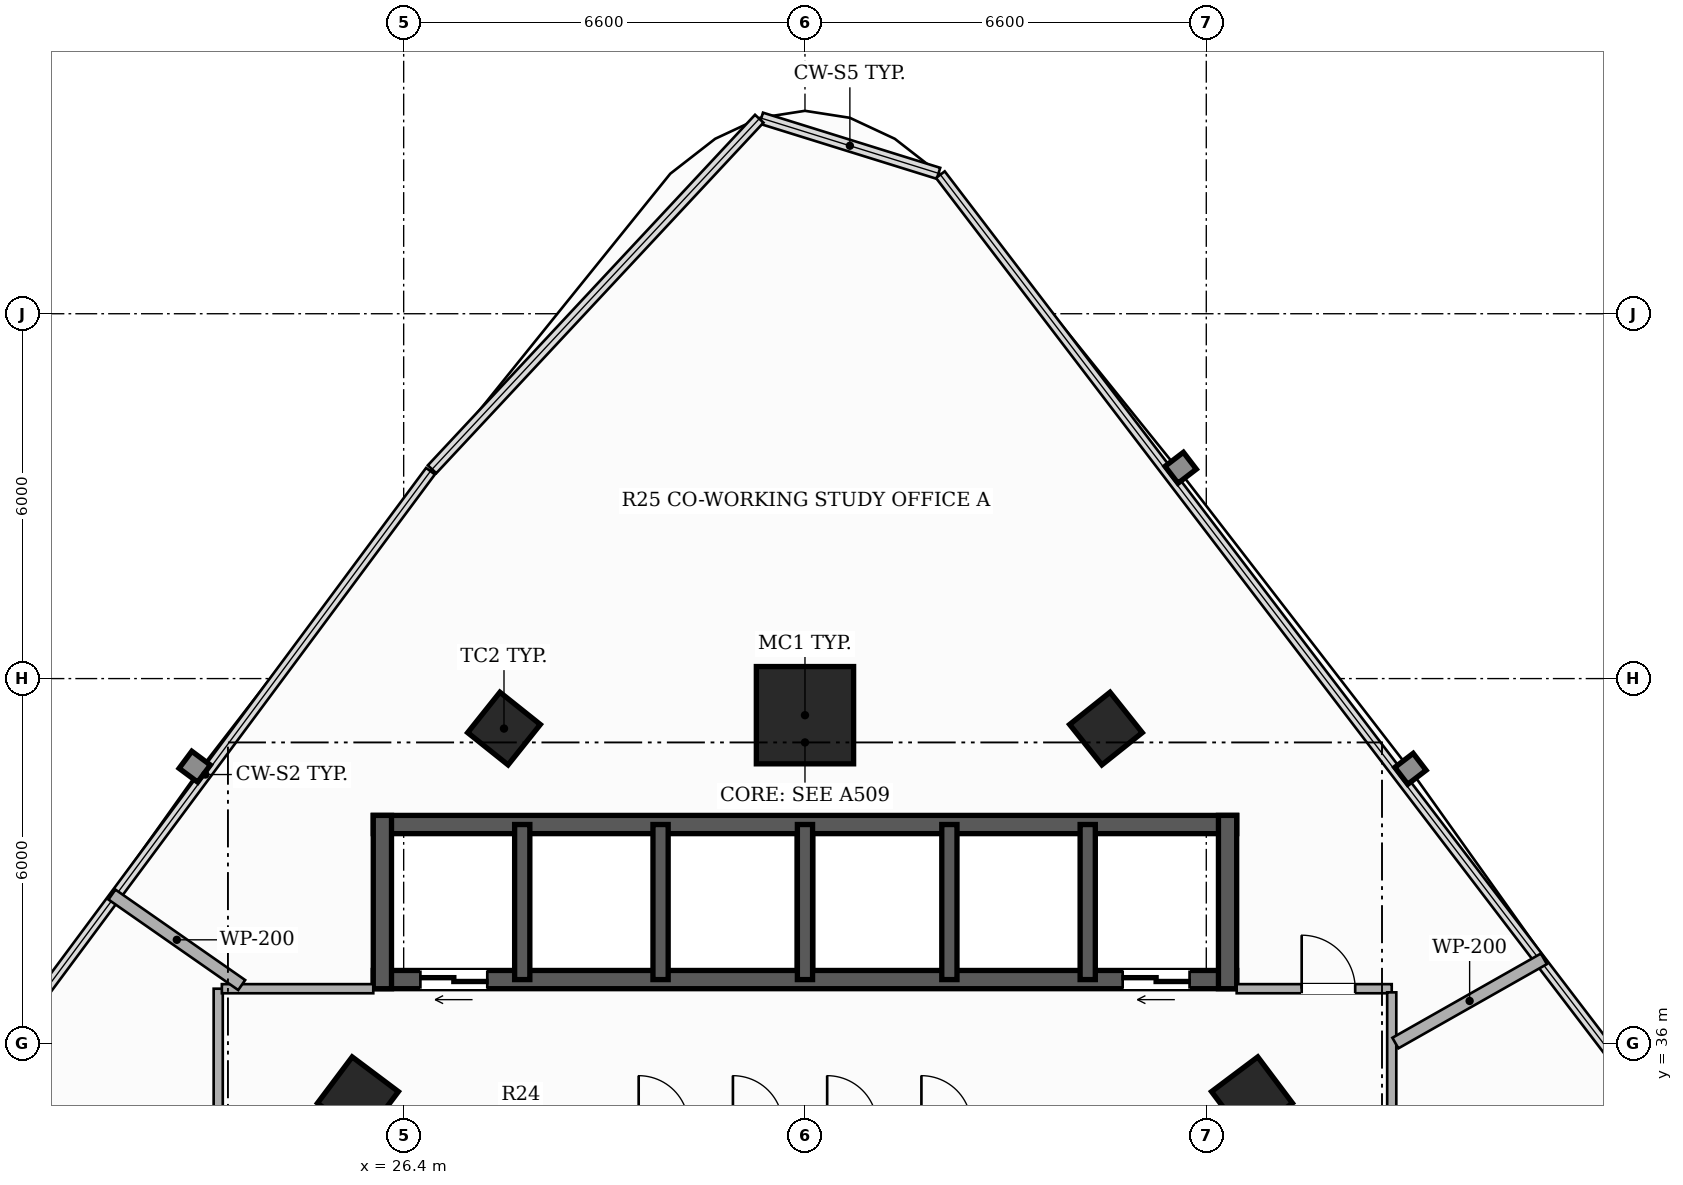
"""IFC4 building model, lengths in metres.
Left out: names, types, materials, properties, quantities, classifications, styles, units other than length and angle.
Written with IfcOpenShell. Run it as: python <this file> out.ifc"""

import sys

from ifc_helpers import new_model, si_unit, direction, frame, frame_2d, origin, origin_2d, place, context, subcontext, project, spatial, rectangle, hollow_rectangle, extrude, element, fill, save


model = new_model("IFC4")
c1 = context("Model", 3, precision=1e-05, world=origin(), true_north=direction((0.0, 1.0)))
c2 = subcontext(c1, "Body", "Model", "MODEL_VIEW")
j1 = project(units=[si_unit("LENGTHUNIT", "METRE"), si_unit("PLANEANGLEUNIT", "RADIAN")], contexts=[c1])
p1 = place(None, origin())
s1 = spatial("IfcSite", under=j1, at=p1, CompositionType="ELEMENT")
p2 = place(p1, origin())
s2 = spatial("IfcBuilding", under=s1, at=p2, CompositionType="ELEMENT")
p3 = place(p2, frame((0.0, 0.0, 70.85)))
s3 = spatial("IfcBuildingStorey", under=s2, at=p3, CompositionType="ELEMENT", Elevation=70.85)
p4 = place(p3, frame((40.1, 37.05, 0.0), z_axis=(0.0, 0.0, 1.0), x_axis=(-1.0, 0.0, 0.0)))
e1 = element("IfcWall", 1, at=p4, inside=s3, PredefinedType="SHEAR", context=c2, shape_type="SweptSolid", body=[
    extrude(rectangle(XDim=14.2, YDim=0.3, at=frame_2d((7.1, 0.0))), origin(), (0.0, 0.0, 1.0), 3.3),
])
p5 = place(p4, frame((12.325, 0.0, 0.0)))
e2 = element("IfcOpeningElement", 2, at=p5, cuts=e1, PredefinedType="OPENING", context=c2, shape_type="SweptSolid", body=[
    extrude(rectangle(XDim=1.1, YDim=2.2, at=frame_2d((0.55, 1.1))), frame((0.0, 0.16, 0.0), z_axis=(0.0, -1.0, 0.0), x_axis=(1.0, 0.0, 0.0)), (0.0, 0.0, 1.0), 0.32),
])
p6 = place(p4, frame((0.775, 0.0, 0.0)))
e3 = element("IfcOpeningElement", 3, at=p6, cuts=e1, PredefinedType="OPENING", context=c2, shape_type="SweptSolid", body=[
    extrude(rectangle(XDim=1.1, YDim=2.2, at=frame_2d((0.55, 1.1))), frame((0.0, 0.16, 0.0), z_axis=(0.0, -1.0, 0.0), x_axis=(1.0, 0.0, 0.0)), (0.0, 0.0, 1.0), 0.32),
])
p7 = place(p3, frame((25.9, 39.6, 0.0), z_axis=(0.0, 0.0, 1.0), x_axis=(1.0, 0.0, 0.0)))
e4 = element("IfcWall", 4, at=p7, inside=s3, PredefinedType="SHEAR", context=c2, shape_type="SweptSolid", body=[
    extrude(rectangle(XDim=14.2, YDim=0.3, at=frame_2d((7.1, 0.0))), origin(), (0.0, 0.0, 1.0), 3.3),
])
for number, where, z_axis, x_axis in (
    (5, (26.05, 36.9, 0.0), (0.0, 0.0, 1.0), (0.0, 1.0, 0.0)),
    (6, (39.95, 36.9, 0.0), (0.0, 0.0, 1.0), (0.0, 1.0, 0.0)),
):
    element("IfcWall", number, at=place(p3, frame(where, z_axis=z_axis, x_axis=x_axis)), inside=s3, PredefinedType="SHEAR", context=c2, shape_type="SweptSolid", body=[
        extrude(rectangle(XDim=2.85, YDim=0.3, at=frame_2d((1.425, 0.0))), origin(), (0.0, 0.0, 1.0), 3.3),
    ])
for number, where, z_axis, x_axis in (
    (7, (28.35, 37.05, 0.0), (0.0, 0.0, 1.0), (0.0, 1.0, 0.0)),
    (8, (30.625, 37.05, 0.0), (0.0, 0.0, 1.0), (0.0, 1.0, 0.0)),
    (9, (33.0, 37.05, 0.0), (0.0, 0.0, 1.0), (0.0, 1.0, 0.0)),
    (10, (35.375, 37.05, 0.0), (0.0, 0.0, 1.0), (0.0, 1.0, 0.0)),
    (11, (37.65, 37.05, 0.0), (0.0, 0.0, 1.0), (0.0, 1.0, 0.0)),
):
    element("IfcWall", number, at=place(p3, frame(where, z_axis=z_axis, x_axis=x_axis)), inside=s3, PredefinedType="SHEAR", context=c2, shape_type="SweptSolid", body=[
        extrude(rectangle(XDim=2.55, YDim=0.25, at=frame_2d((1.275, 0.0))), origin(), (0.0, 0.0, 1.0), 3.3),
    ])
p8 = place(p3, frame((33.0, 41.398, 0.0), z_axis=(0.0, 0.0, 1.0), x_axis=(1.0, 0.0, 0.0)))
e12 = element("IfcColumn", 12, at=p8, inside=s3, PredefinedType="COLUMN", context=c2, shape_type="SweptSolid", body=[
    extrude(hollow_rectangle(XDim=1.6, YDim=1.6, WallThickness=0.05, at=origin_2d()), origin(), (0.0, 0.0, 1.0), 3.3),
])
for number, where, z_axis, x_axis in (
    (13, (25.648, 35.113, 0.0), (0.0, 0.0, 1.0), (0.6, 0.8, 0.0)),
    (14, (40.352, 35.113, 0.0), (0.0, 0.0, 1.0), (-0.6, 0.8, 0.0)),
):
    element("IfcColumn", number, at=place(p3, frame(where, z_axis=z_axis, x_axis=x_axis)), inside=s3, PredefinedType="COLUMN", context=c2, shape_type="SweptSolid", body=[
        extrude(hollow_rectangle(XDim=0.95, YDim=0.95, WallThickness=0.032, at=origin_2d()), origin(), (0.0, 0.0, 1.0), 3.3),
    ])
for number, where, z_axis, x_axis in (
    (15, (28.05, 41.178, 0.0), (0.0, 0.0, 1.0), (0.624, 0.782, 0.0)),
    (16, (37.95, 41.178, 0.0), (0.0, 0.0, 1.0), (-0.624, 0.782, 0.0)),
):
    element("IfcColumn", number, at=place(p3, frame(where, z_axis=z_axis, x_axis=x_axis)), inside=s3, PredefinedType="COLUMN", context=c2, shape_type="SweptSolid", body=[
        extrude(hollow_rectangle(XDim=0.85, YDim=0.85, WallThickness=0.028, at=origin_2d()), origin(), (0.0, 0.0, 1.0), 3.3),
    ])
p9 = place(p3, frame((40.1, 36.9, 0.0), z_axis=(0.0, 0.0, 1.0), x_axis=(1.0, 0.0, 0.0)))
e17 = element("IfcWall", 17, at=p9, inside=s3, PredefinedType="PARTITIONING", context=c2, shape_type="SweptSolid", body=[
    extrude(rectangle(XDim=2.55, YDim=0.15, at=frame_2d((1.275, 0.0))), origin(), (0.0, 0.0, 1.0), 2.413),
])
p10 = place(p9, frame((1.069, 0.0, 0.0)))
e18 = element("IfcOpeningElement", 18, at=p10, cuts=e17, PredefinedType="OPENING", context=c2, shape_type="SweptSolid", body=[
    extrude(rectangle(XDim=0.88, YDim=2.1, at=frame_2d((0.44, 1.05))), frame((0.0, 0.085, 0.0), z_axis=(0.0, -1.0, 0.0), x_axis=(1.0, 0.0, 0.0)), (0.0, 0.0, 1.0), 0.17),
])
p11 = place(p3, frame((42.65, 36.84, 0.0), z_axis=(0.0, 0.0, 1.0), x_axis=(0.0, -1.0, 0.0)))
e19 = element("IfcWall", 19, at=p11, inside=s3, PredefinedType="PARTITIONING", context=c2, shape_type="SweptSolid", body=[
    extrude(rectangle(XDim=25.04, YDim=0.15, at=frame_2d((12.52, 0.0))), origin(), (0.0, 0.0, 1.0), 2.413),
])
p12 = place(p11, frame((6.597, 0.0, 0.0)))
e20 = element("IfcOpeningElement", 20, at=p12, cuts=e19, PredefinedType="OPENING", context=c2, shape_type="SweptSolid", body=[
    extrude(rectangle(XDim=0.88, YDim=2.1, at=frame_2d((0.44, 1.05))), frame((0.0, 0.085, 0.0), z_axis=(0.0, -1.0, 0.0), x_axis=(1.0, 0.0, 0.0)), (0.0, 0.0, 1.0), 0.17),
])
p13 = place(p11, frame((19.777, 0.0, 0.0)))
e21 = element("IfcOpeningElement", 21, at=p13, cuts=e19, PredefinedType="OPENING", context=c2, shape_type="SweptSolid", body=[
    extrude(rectangle(XDim=0.88, YDim=2.1, at=frame_2d((0.44, 1.05))), frame((0.0, 0.085, 0.0), z_axis=(0.0, -1.0, 0.0), x_axis=(1.0, 0.0, 0.0)), (0.0, 0.0, 1.0), 0.17),
])
p14 = place(p11, frame((14.193, 0.0, 0.0)))
e22 = element("IfcOpeningElement", 22, at=p14, cuts=e19, PredefinedType="OPENING", context=c2, shape_type="SweptSolid", body=[
    extrude(rectangle(XDim=0.88, YDim=2.1, at=frame_2d((0.44, 1.05))), frame((0.0, 0.085, 0.0), z_axis=(0.0, -1.0, 0.0), x_axis=(1.0, 0.0, 0.0)), (0.0, 0.0, 1.0), 0.17),
])
p15 = place(p3, frame((23.35, 11.86, 0.0), z_axis=(0.0, 0.0, 1.0), x_axis=(0.0, 1.0, 0.0)))
e23 = element("IfcWall", 23, at=p15, inside=s3, PredefinedType="PARTITIONING", context=c2, shape_type="SweptSolid", body=[
    extrude(rectangle(XDim=25.04, YDim=0.15, at=frame_2d((12.52, 0.0))), origin(), (0.0, 0.0, 1.0), 2.413),
])
p16 = place(p15, frame((18.154, 0.0, 0.0)))
e24 = element("IfcOpeningElement", 24, at=p16, cuts=e23, PredefinedType="OPENING", context=c2, shape_type="SweptSolid", body=[
    extrude(rectangle(XDim=0.88, YDim=2.1, at=frame_2d((0.44, 1.05))), frame((0.0, 0.085, 0.0), z_axis=(0.0, -1.0, 0.0), x_axis=(1.0, 0.0, 0.0)), (0.0, 0.0, 1.0), 0.17),
])
p17 = place(p15, frame((10.346, 0.0, 0.0)))
e25 = element("IfcOpeningElement", 25, at=p17, cuts=e23, PredefinedType="OPENING", context=c2, shape_type="SweptSolid", body=[
    extrude(rectangle(XDim=0.88, YDim=2.1, at=frame_2d((0.44, 1.05))), frame((0.0, 0.085, 0.0), z_axis=(0.0, -1.0, 0.0), x_axis=(1.0, 0.0, 0.0)), (0.0, 0.0, 1.0), 0.17),
])
p18 = place(p15, frame((6.32, 0.0, 0.0)))
e26 = element("IfcOpeningElement", 26, at=p18, cuts=e23, PredefinedType="OPENING", context=c2, shape_type="SweptSolid", body=[
    extrude(rectangle(XDim=0.88, YDim=2.1, at=frame_2d((0.44, 1.05))), frame((0.0, 0.085, 0.0), z_axis=(0.0, -1.0, 0.0), x_axis=(1.0, 0.0, 0.0)), (0.0, 0.0, 1.0), 0.17),
])
p19 = place(p15, frame((1.719, 0.0, 0.0)))
e27 = element("IfcOpeningElement", 27, at=p19, cuts=e23, PredefinedType="OPENING", context=c2, shape_type="SweptSolid", body=[
    extrude(rectangle(XDim=0.88, YDim=2.1, at=frame_2d((0.44, 1.05))), frame((0.0, 0.085, 0.0), z_axis=(0.0, -1.0, 0.0), x_axis=(1.0, 0.0, 0.0)), (0.0, 0.0, 1.0), 0.17),
])
p20 = place(p3, frame((23.41, 36.9, 0.0), z_axis=(0.0, 0.0, 1.0), x_axis=(1.0, 0.0, 0.0)))
e28 = element("IfcWall", 28, at=p20, inside=s3, PredefinedType="PARTITIONING", context=c2, shape_type="SweptSolid", body=[
    extrude(rectangle(XDim=2.49, YDim=0.15, at=frame_2d((1.245, 0.0))), origin(), (0.0, 0.0, 1.0), 2.413),
])
p21 = place(p3, frame((45.152, 37.391, 0.0), z_axis=(0.0, 0.0, 1.0), x_axis=(-0.86984931175, -0.4933175193, 0.0)))
e29 = element("IfcWall", 29, at=p21, inside=s3, PredefinedType="PARTITIONING", context=c2, shape_type="SweptSolid", body=[
    extrude(rectangle(XDim=2.808, YDim=0.2, at=frame_2d((1.404, 0.0))), origin(), (0.0, 0.0, 1.0), 2.619),
])
p22 = place(p3, frame((23.736, 36.96, 0.0), z_axis=(0.0, 0.0, 1.0), x_axis=(-0.820275422115, 0.571968733302, 0.0)))
e30 = element("IfcWall", 30, at=p22, inside=s3, PredefinedType="PARTITIONING", context=c2, shape_type="SweptSolid", body=[
    extrude(rectangle(XDim=2.602, YDim=0.2, at=frame_2d((1.301, 0.0))), origin(), (0.0, 0.0, 1.0), 3.06),
])
p23 = place(p5, origin())
e31 = element("IfcDoor", 31, at=p23, inside=s3, OperationType="DOUBLE_DOOR_SLIDING", PredefinedType="DOOR", context=c2, shape_type="SweptSolid", body=[
    extrude(rectangle(XDim=1.1, YDim=2.2, at=frame_2d((0.55, 1.1))), frame((0.0, 0.025, 0.0), z_axis=(0.0, -1.0, 0.0), x_axis=(1.0, 0.0, 0.0)), (0.0, 0.0, 1.0), 0.05),
])
fill(e2, e31)
p24 = place(p6, origin())
e32 = element("IfcDoor", 32, at=p24, inside=s3, OperationType="DOUBLE_DOOR_SLIDING", PredefinedType="DOOR", context=c2, shape_type="SweptSolid", body=[
    extrude(rectangle(XDim=1.1, YDim=2.2, at=frame_2d((0.55, 1.1))), frame((0.0, 0.025, 0.0), z_axis=(0.0, -1.0, 0.0), x_axis=(1.0, 0.0, 0.0)), (0.0, 0.0, 1.0), 0.05),
])
fill(e3, e32)
p25 = place(p10, origin())
e33 = element("IfcDoor", 33, at=p25, inside=s3, OperationType="SINGLE_SWING_LEFT", PredefinedType="DOOR", context=c2, shape_type="SweptSolid", body=[
    extrude(rectangle(XDim=0.88, YDim=2.1, at=frame_2d((0.44, 1.05))), frame((0.0, 0.025, 0.0), z_axis=(0.0, -1.0, 0.0), x_axis=(1.0, 0.0, 0.0)), (0.0, 0.0, 1.0), 0.05),
])
fill(e18, e33)
save(model, sys.argv[1])
